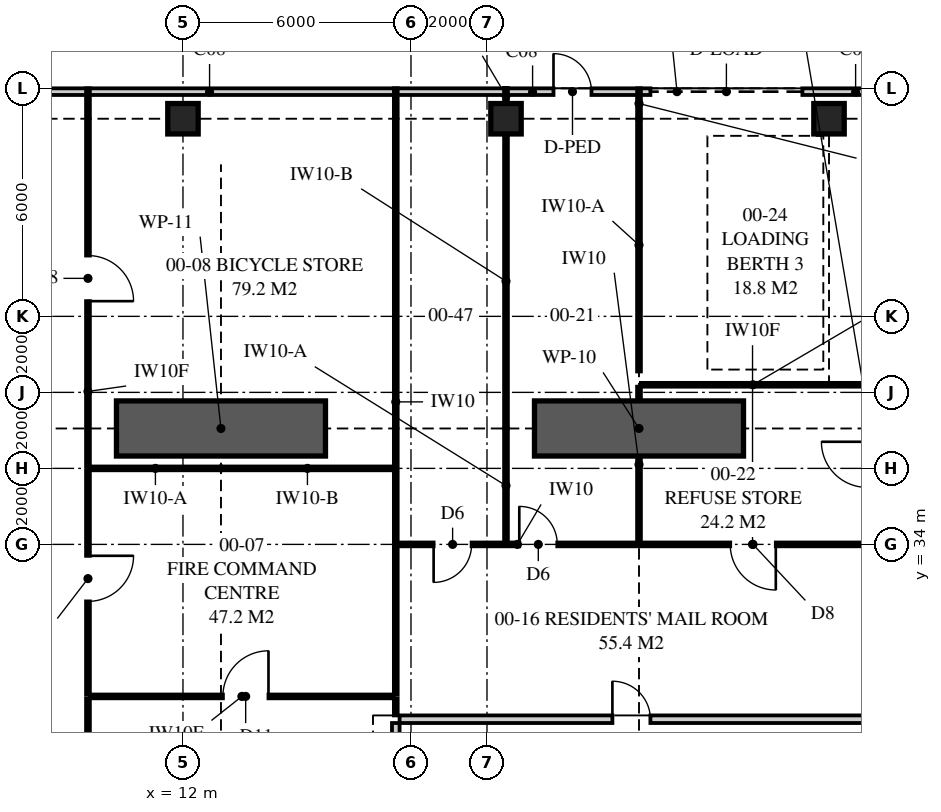
"""IFC4 building model, lengths in metres.
Left out: names, types, materials, properties, quantities, classifications, styles, units other than length and angle.
Written with IfcOpenShell. Run it as: python <this file> out.ifc"""

import sys

from ifc_helpers import new_model, si_unit, direction, frame, frame_2d, origin, origin_2d, place, context, subcontext, project, spatial, polyline, rectangle, outline, extrude, element, fill, save


model = new_model("IFC4")
c1 = context("Model", 3, precision=1e-05, world=origin(), true_north=direction((0.0, 1.0)))
c2 = subcontext(c1, "Body", "Model", "MODEL_VIEW")
j1 = project(units=[si_unit("LENGTHUNIT", "METRE"), si_unit("PLANEANGLEUNIT", "RADIAN")], contexts=[c1])
p1 = place(None, origin())
s1 = spatial("IfcSite", under=j1, at=p1, CompositionType="ELEMENT")
p2 = place(p1, origin())
s2 = spatial("IfcBuilding", under=s1, at=p2, CompositionType="ELEMENT")
p3 = place(p2, origin())
s3 = spatial("IfcBuildingStorey", under=s2, at=p3, CompositionType="ELEMENT", Elevation=0.0)
for number, where, z_axis, x_axis in (
    (1, (12.0, 45.2, 0.0), (0.0, 0.0, 1.0), (1.0, 0.0, 0.0)),
    (2, (20.5, 45.2, 0.0), (0.0, 0.0, 1.0), (1.0, 0.0, 0.0)),
    (3, (29.0, 45.2, 0.0), (0.0, 0.0, 1.0), (1.0, 0.0, 0.0)),
):
    element("IfcColumn", number, at=place(p3, frame(where, z_axis=z_axis, x_axis=x_axis)), inside=s3, PredefinedType="COLUMN", context=c2, shape_type="SweptSolid", body=[
        extrude(rectangle(XDim=0.8, YDim=0.8, at=origin_2d()), origin(), (0.0, 0.0, 1.0), 6.0),
    ])
p4 = place(p3, frame((59.2, 45.913, 0.0), z_axis=(0.0, 0.0, 1.0), x_axis=(-1.0, 0.0, 0.0)))
e4 = element("IfcWall", 4, at=p4, inside=s3, PredefinedType="SOLIDWALL", context=c2, shape_type="SweptSolid", body=[
    extrude(rectangle(XDim=68.4, YDim=0.175, at=frame_2d((34.2, 0.0))), origin(), (0.0, 0.0, 1.0), 5.12),
])
p5 = place(p4, frame((0.6, 0.0, 0.0)))
e5 = element("IfcOpeningElement", 5, at=p5, cuts=e4, PredefinedType="OPENING", context=c2, shape_type="SweptSolid", body=[
    extrude(rectangle(XDim=3.6, YDim=4.8, at=frame_2d((1.8, 2.4))), frame((0.0, 0.097, 0.0), z_axis=(0.0, -1.0, 0.0), x_axis=(1.0, 0.0, 0.0)), (0.0, 0.0, 1.0), 0.195),
])
p6 = place(p4, frame((7.1, 0.0, 0.0)))
e6 = element("IfcOpeningElement", 6, at=p6, cuts=e4, PredefinedType="OPENING", context=c2, shape_type="SweptSolid", body=[
    extrude(rectangle(XDim=4.0, YDim=3.0, at=frame_2d((2.0, 1.5))), frame((0.0, 0.097, 0.0), z_axis=(0.0, -1.0, 0.0), x_axis=(1.0, 0.0, 0.0)), (0.0, 0.0, 1.0), 0.195),
])
p7 = place(p4, frame((30.9, 0.0, 0.0)))
e7 = element("IfcOpeningElement", 7, at=p7, cuts=e4, PredefinedType="OPENING", context=c2, shape_type="SweptSolid", body=[
    extrude(rectangle(XDim=4.0, YDim=4.5, at=frame_2d((2.0, 2.25))), frame((0.0, 0.097, 0.0), z_axis=(0.0, -1.0, 0.0), x_axis=(1.0, 0.0, 0.0)), (0.0, 0.0, 1.0), 0.195),
])
p8 = place(p4, frame((17.0, 0.0, 0.0)))
e8 = element("IfcOpeningElement", 8, at=p8, cuts=e4, PredefinedType="OPENING", context=c2, shape_type="SweptSolid", body=[
    extrude(rectangle(XDim=4.0, YDim=4.5, at=frame_2d((2.0, 2.25))), frame((0.0, 0.097, 0.0), z_axis=(0.0, -1.0, 0.0), x_axis=(1.0, 0.0, 0.0)), (0.0, 0.0, 1.0), 0.195),
])
p9 = place(p4, frame((36.45, 0.0, 0.0)))
e9 = element("IfcOpeningElement", 9, at=p9, cuts=e4, PredefinedType="OPENING", context=c2, shape_type="SweptSolid", body=[
    extrude(rectangle(XDim=1.0, YDim=2.2, at=frame_2d((0.5, 1.1))), frame((0.0, 0.097, 0.0), z_axis=(0.0, -1.0, 0.0), x_axis=(1.0, 0.0, 0.0)), (0.0, 0.0, 1.0), 0.195),
])
p10 = place(p4, frame((51.95, 0.0, 0.0)))
e10 = element("IfcOpeningElement", 10, at=p10, cuts=e4, PredefinedType="OPENING", context=c2, shape_type="SweptSolid", body=[
    extrude(rectangle(XDim=2.0, YDim=2.7, at=frame_2d((1.0, 1.35))), frame((0.0, 0.097, 0.0), z_axis=(0.0, -1.0, 0.0), x_axis=(1.0, 0.0, 0.0)), (0.0, 0.0, 1.0), 0.195),
])
p11 = place(p4, frame((61.781, 0.0, 0.0)))
e11 = element("IfcOpeningElement", 11, at=p11, cuts=e4, PredefinedType="OPENING", context=c2, shape_type="SweptSolid", body=[
    extrude(rectangle(XDim=1.8, YDim=2.7, at=frame_2d((0.9, 1.35))), frame((0.0, 0.097, 0.0), z_axis=(0.0, -1.0, 0.0), x_axis=(1.0, 0.0, 0.0)), (0.0, 0.0, 1.0), 0.195),
])
p12 = place(p4, frame((57.666, 0.0, 0.3)))
e12 = element("IfcOpeningElement", 12, at=p12, cuts=e4, PredefinedType="OPENING", context=c2, shape_type="SweptSolid", body=[
    extrude(rectangle(XDim=2.4, YDim=3.0, at=frame_2d((1.2, 1.5))), frame((0.0, 0.097, 0.0), z_axis=(0.0, -1.0, 0.0), x_axis=(1.0, 0.0, 0.0)), (0.0, 0.0, 1.0), 0.195),
])
p13 = place(p4, frame((65.129, 0.0, 0.3)))
e13 = element("IfcOpeningElement", 13, at=p13, cuts=e4, PredefinedType="OPENING", context=c2, shape_type="SweptSolid", body=[
    extrude(rectangle(XDim=2.4, YDim=3.0, at=frame_2d((1.2, 1.5))), frame((0.0, 0.097, 0.0), z_axis=(0.0, -1.0, 0.0), x_axis=(1.0, 0.0, 0.0)), (0.0, 0.0, 1.0), 0.195),
])
p14 = place(p3, frame((9.5, 25.0, 0.0), z_axis=(0.0, 0.0, 1.0), x_axis=(0.0, 1.0, 0.0)))
e14 = element("IfcWall", 14, at=p14, inside=s3, PredefinedType="PARTITIONING", context=c2, shape_type="SweptSolid", body=[
    extrude(outline(polyline([(0.0, 0.0), (4.95, 0.0), (4.95, 5.72), (1.26, 5.72), (1.26, 5.12), (0.0, 5.12), (0.0, 0.0)])), frame((0.0, 0.05, 0.0), z_axis=(0.0, -1.0, 0.0), x_axis=(1.0, 0.0, 0.0)), (0.0, 0.0, 1.0), 0.1),
])
p15 = place(p3, frame((9.5, 30.05, 0.0), z_axis=(0.0, 0.0, 1.0), x_axis=(0.0, 1.0, 0.0)))
e15 = element("IfcWall", 15, at=p15, inside=s3, PredefinedType="PARTITIONING", context=c2, shape_type="SweptSolid", body=[
    extrude(outline(polyline([(0.0, 0.0), (5.9, 0.0), (5.9, 5.72), (5.9, 4.92), (5.74, 4.92), (5.74, 5.72), (0.0, 5.72), (0.0, 0.0)])), frame((0.0, 0.05, 0.0), z_axis=(0.0, -1.0, 0.0), x_axis=(1.0, 0.0, 0.0)), (0.0, 0.0, 1.0), 0.1),
])
p16 = place(p15, frame((2.45, 0.0, 0.0)))
e16 = element("IfcOpeningElement", 16, at=p16, cuts=e15, PredefinedType="OPENING", context=c2, shape_type="SweptSolid", body=[
    extrude(rectangle(XDim=1.2, YDim=2.2, at=frame_2d((0.6, 1.1))), frame((0.0, 0.06, 0.0), z_axis=(0.0, -1.0, 0.0), x_axis=(1.0, 0.0, 0.0)), (0.0, 0.0, 1.0), 0.12),
])
p17 = place(p3, frame((9.5, 36.05, 0.0), z_axis=(0.0, 0.0, 1.0), x_axis=(0.0, 1.0, 0.0)))
e17 = element("IfcWall", 17, at=p17, inside=s3, PredefinedType="PARTITIONING", context=c2, shape_type="SweptSolid", body=[
    extrude(outline(polyline([(0.0, 0.0), (9.95, 0.0), (9.95, 5.72), (9.95, 5.12), (7.89, 5.12), (7.89, 5.72), (2.26, 5.72), (2.26, 4.92), (0.0, 4.92), (0.0, 5.72), (0.0, 0.0)])), frame((0.0, 0.05, 0.0), z_axis=(0.0, -1.0, 0.0), x_axis=(1.0, 0.0, 0.0)), (0.0, 0.0, 1.0), 0.1),
])
p18 = place(p17, frame((4.35, 0.0, 0.0)))
e18 = element("IfcOpeningElement", 18, at=p18, cuts=e17, PredefinedType="OPENING", context=c2, shape_type="SweptSolid", body=[
    extrude(rectangle(XDim=1.2, YDim=2.4, at=frame_2d((0.6, 1.2))), frame((0.0, 0.06, 0.0), z_axis=(0.0, -1.0, 0.0), x_axis=(1.0, 0.0, 0.0)), (0.0, 0.0, 1.0), 0.12),
])
p19 = place(p3, frame((9.55, 30.0, 0.0), z_axis=(0.0, 0.0, 1.0), x_axis=(1.0, 0.0, 0.0)))
e19 = element("IfcWall", 19, at=p19, inside=s3, PredefinedType="PARTITIONING", context=c2, shape_type="SweptSolid", body=[
    extrude(outline(polyline([(0.0, 0.0), (8.0, 0.0), (8.0, 5.72), (4.71, 5.72), (4.71, 5.12), (2.19, 5.12), (2.19, 5.72), (0.0, 5.72), (0.0, 0.0)])), frame((0.0, 0.05, 0.0), z_axis=(0.0, -1.0, 0.0), x_axis=(1.0, 0.0, 0.0)), (0.0, 0.0, 1.0), 0.1),
])
p20 = place(p19, frame((3.5, 0.0, 0.0)))
e20 = element("IfcOpeningElement", 20, at=p20, cuts=e19, PredefinedType="OPENING", context=c2, shape_type="SweptSolid", body=[
    extrude(rectangle(XDim=1.2, YDim=2.2, at=frame_2d((0.6, 1.1))), frame((0.0, 0.06, 0.0), z_axis=(0.0, -1.0, 0.0), x_axis=(1.0, 0.0, 0.0)), (0.0, 0.0, 1.0), 0.12),
])
p21 = place(p3, frame((17.6, 27.75, 0.0), z_axis=(0.0, 0.0, 1.0), x_axis=(0.0, 1.0, 0.0)))
e21 = element("IfcWall", 21, at=p21, inside=s3, PredefinedType="PARTITIONING", context=c2, shape_type="SweptSolid", body=[
    extrude(rectangle(XDim=1.55, YDim=0.2, at=frame_2d((0.775, 0.0))), origin(), (0.0, 0.0, 1.0), 5.72),
])
p22 = place(p3, frame((17.6, 29.5, 0.0), z_axis=(0.0, 0.0, 1.0), x_axis=(0.0, 1.0, 0.0)))
e22 = element("IfcWall", 22, at=p22, inside=s3, PredefinedType="PARTITIONING", context=c2, shape_type="SweptSolid", body=[
    extrude(rectangle(XDim=0.45, YDim=0.1, at=frame_2d((0.225, 0.0))), origin(), (0.0, 0.0, 1.0), 5.72),
])
p23 = place(p3, frame((9.55, 36.0, 0.0), z_axis=(0.0, 0.0, 1.0), x_axis=(1.0, 0.0, 0.0)))
e23 = element("IfcWall", 23, at=p23, inside=s3, PredefinedType="PARTITIONING", context=c2, shape_type="SweptSolid", body=[
    extrude(rectangle(XDim=3.45, YDim=0.1, at=frame_2d((1.725, 0.0))), origin(), (0.0, 0.0, 1.0), 4.92),
])
p24 = place(p3, frame((13.0, 36.0, 0.0), z_axis=(0.0, 0.0, 1.0), x_axis=(1.0, 0.0, 0.0)))
e24 = element("IfcWall", 24, at=p24, inside=s3, PredefinedType="PARTITIONING", context=c2, shape_type="SweptSolid", body=[
    extrude(outline(polyline([(0.0, 0.0), (4.55, 0.0), (4.55, 5.12), (0.06, 5.12), (0.06, 4.92), (0.0, 4.92), (0.0, 0.0)])), frame((0.0, 0.05, 0.0), z_axis=(0.0, -1.0, 0.0), x_axis=(1.0, 0.0, 0.0)), (0.0, 0.0, 1.0), 0.1),
])
p25 = place(p3, frame((17.6, 30.05, 0.0), z_axis=(0.0, 0.0, 1.0), x_axis=(0.0, 1.0, 0.0)))
e25 = element("IfcWall", 25, at=p25, inside=s3, PredefinedType="PARTITIONING", context=c2, shape_type="SweptSolid", body=[
    extrude(rectangle(XDim=3.9, YDim=0.1, at=frame_2d((1.95, 0.0))), origin(), (0.0, 0.0, 1.0), 5.72),
])
p26 = place(p3, frame((17.6, 34.05, 0.0), z_axis=(0.0, 0.0, 1.0), x_axis=(0.0, 1.0, 0.0)))
e26 = element("IfcWall", 26, at=p26, inside=s3, PredefinedType="PARTITIONING", context=c2, shape_type="SweptSolid", body=[
    extrude(outline(polyline([(0.0, 0.0), (1.9, 0.0), (1.9, 5.72), (1.9, 5.12), (1.74, 5.12), (1.74, 5.72), (0.0, 5.72), (0.0, 0.0)])), frame((0.0, 0.05, 0.0), z_axis=(0.0, -1.0, 0.0), x_axis=(1.0, 0.0, 0.0)), (0.0, 0.0, 1.0), 0.1),
])
p27 = place(p3, frame((17.6, 36.05, 0.0), z_axis=(0.0, 0.0, 1.0), x_axis=(0.0, 1.0, 0.0)))
e27 = element("IfcWall", 27, at=p27, inside=s3, PredefinedType="PARTITIONING", context=c2, shape_type="SweptSolid", body=[
    extrude(outline(polyline([(0.0, 0.0), (9.95, 0.0), (9.95, 5.72), (9.95, 5.12), (7.89, 5.12), (7.89, 5.72), (2.26, 5.72), (2.26, 5.12), (0.0, 5.12), (0.0, 5.72), (0.0, 0.0)])), frame((0.0, 0.05, 0.0), z_axis=(0.0, -1.0, 0.0), x_axis=(1.0, 0.0, 0.0)), (0.0, 0.0, 1.0), 0.1),
])
p28 = place(p3, frame((17.7, 29.4, 0.0), z_axis=(0.0, 0.0, 1.0), x_axis=(1.0, 0.0, 0.0)))
e28 = element("IfcWall", 28, at=p28, inside=s3, PredefinedType="PARTITIONING", context=c2, shape_type="SweptSolid", body=[
    extrude(outline(polyline([(0.0, 0.0), (12.225, 0.0), (12.225, 5.72), (7.61, 5.72), (7.61, 5.12), (4.99, 5.12), (4.99, 5.72), (0.0, 5.72), (0.0, 0.0)])), frame((0.0, 0.1, 0.0), z_axis=(0.0, -1.0, 0.0), x_axis=(1.0, 0.0, 0.0)), (0.0, 0.0, 1.0), 0.2),
])
p29 = place(p28, frame((5.6, 0.0, 0.0)))
e29 = element("IfcOpeningElement", 29, at=p29, cuts=e28, PredefinedType="OPENING", context=c2, shape_type="SweptSolid", body=[
    extrude(rectangle(XDim=1.0, YDim=2.1, at=frame_2d((0.5, 1.05))), frame((0.0, 0.11, 0.0), z_axis=(0.0, -1.0, 0.0), x_axis=(1.0, 0.0, 0.0)), (0.0, 0.0, 1.0), 0.22),
])
p30 = place(p3, frame((17.65, 34.0, 0.0), z_axis=(0.0, 0.0, 1.0), x_axis=(1.0, 0.0, 0.0)))
e30 = element("IfcWall", 30, at=p30, inside=s3, PredefinedType="PARTITIONING", context=c2, shape_type="SweptSolid", body=[
    extrude(outline(polyline([(0.0, 0.0), (6.3, 0.0), (6.3, 5.72), (6.3, 5.12), (5.09, 5.12), (5.09, 5.72), (0.0, 5.72), (0.0, 0.0)])), frame((0.0, 0.05, 0.0), z_axis=(0.0, -1.0, 0.0), x_axis=(1.0, 0.0, 0.0)), (0.0, 0.0, 1.0), 0.1),
])
p31 = place(p30, frame((3.2, 0.0, 0.0)))
e31 = element("IfcOpeningElement", 31, at=p31, cuts=e30, PredefinedType="OPENING", context=c2, shape_type="SweptSolid", body=[
    extrude(rectangle(XDim=1.0, YDim=2.1, at=frame_2d((0.5, 1.05))), frame((0.0, 0.06, 0.0), z_axis=(0.0, -1.0, 0.0), x_axis=(1.0, 0.0, 0.0)), (0.0, 0.0, 1.0), 0.12),
])
p32 = place(p30, frame((0.946, 0.0, 0.0)))
e32 = element("IfcOpeningElement", 32, at=p32, cuts=e30, PredefinedType="OPENING", context=c2, shape_type="SweptSolid", body=[
    extrude(rectangle(XDim=1.0, YDim=2.1, at=frame_2d((0.5, 1.05))), frame((0.0, 0.06, 0.0), z_axis=(0.0, -1.0, 0.0), x_axis=(1.0, 0.0, 0.0)), (0.0, 0.0, 1.0), 0.12),
])
p33 = place(p3, frame((24.05, 34.0, 0.0), z_axis=(0.0, 0.0, 1.0), x_axis=(1.0, 0.0, 0.0)))
e33 = element("IfcWall", 33, at=p33, inside=s3, PredefinedType="PARTITIONING", context=c2, shape_type="SweptSolid", body=[
    extrude(outline(polyline([(0.0, 0.0), (5.875, 0.0), (5.875, 5.72), (1.21, 5.72), (1.21, 5.12), (0.0, 5.12), (0.0, 5.72), (0.0, 0.0)])), frame((0.0, 0.05, 0.0), z_axis=(0.0, -1.0, 0.0), x_axis=(1.0, 0.0, 0.0)), (0.0, 0.0, 1.0), 0.1),
])
p34 = place(p33, frame((2.35, 0.0, 0.0)))
e34 = element("IfcOpeningElement", 34, at=p34, cuts=e33, PredefinedType="OPENING", context=c2, shape_type="SweptSolid", body=[
    extrude(rectangle(XDim=1.2, YDim=2.4, at=frame_2d((0.6, 1.2))), frame((0.0, 0.06, 0.0), z_axis=(0.0, -1.0, 0.0), x_axis=(1.0, 0.0, 0.0)), (0.0, 0.0, 1.0), 0.12),
])
p35 = place(p3, frame((24.0, 34.05, 0.0), z_axis=(0.0, 0.0, 1.0), x_axis=(0.0, 1.0, 0.0)))
e35 = element("IfcWall", 35, at=p35, inside=s3, PredefinedType="PARTITIONING", context=c2, shape_type="SweptSolid", body=[
    extrude(outline(polyline([(0.0, 0.0), (4.1, 0.0), (4.1, 5.72), (4.1, 5.12), (3.06, 5.12), (0.0, 5.12), (0.0, 5.72), (0.0, 0.0)])), frame((0.0, 0.05, 0.0), z_axis=(0.0, -1.0, 0.0), x_axis=(1.0, 0.0, 0.0)), (0.0, 0.0, 1.0), 0.1),
])
p36 = place(p3, frame((24.0, 38.55, 0.0), z_axis=(0.0, 0.0, 1.0), x_axis=(0.0, 1.0, 0.0)))
e36 = element("IfcWall", 36, at=p36, inside=s3, PredefinedType="PARTITIONING", context=c2, shape_type="SweptSolid", body=[
    extrude(rectangle(XDim=6.65, YDim=0.1, at=frame_2d((3.325, 0.0))), origin(), (0.0, 0.0, 1.0), 5.12),
])
p37 = place(p3, frame((24.0, 45.2, 0.0), z_axis=(0.0, 0.0, 1.0), x_axis=(0.0, 1.0, 0.0)))
e37 = element("IfcWall", 37, at=p37, inside=s3, PredefinedType="PARTITIONING", context=c2, shape_type="SweptSolid", body=[
    extrude(rectangle(XDim=0.8, YDim=0.1, at=frame_2d((0.4, 0.0))), origin(), (0.0, 0.0, 1.0), 5.12),
])
p38 = place(p3, frame((24.05, 38.2, 0.0), z_axis=(0.0, 0.0, 1.0), x_axis=(1.0, 0.0, 0.0)))
e38 = element("IfcWall", 38, at=p38, inside=s3, PredefinedType="PARTITIONING", context=c2, shape_type="SweptSolid", body=[
    extrude(outline(polyline([(0.0, 0.0), (5.9, 0.0), (5.9, 5.72), (5.9, 5.12), (1.21, 5.12), (0.01, 5.12), (0.0, 5.12), (0.0, 5.72), (0.0, 0.0)])), frame((0.0, 0.05, 0.0), z_axis=(0.0, -1.0, 0.0), x_axis=(1.0, 0.0, 0.0)), (0.0, 0.0, 1.0), 0.1),
])
p39 = place(p3, frame((20.5, 34.04, 0.0), z_axis=(0.0, 0.0, 1.0), x_axis=(0.0, 1.0, 0.0)))
e39 = element("IfcWall", 39, at=p39, inside=s3, PredefinedType="PARTITIONING", context=c2, shape_type="SweptSolid", body=[
    extrude(outline(polyline([(0.0, 0.0), (3.01, 0.0), (3.01, 5.12), (1.75, 5.12), (1.75, 5.72), (0.0, 5.72), (0.0, 0.0)])), frame((0.0, 0.05, 0.0), z_axis=(0.0, -1.0, 0.0), x_axis=(1.0, 0.0, 0.0)), (0.0, 0.0, 1.0), 0.1),
])
p40 = place(p3, frame((20.5, 37.05, 0.0), z_axis=(0.0, 0.0, 1.0), x_axis=(0.0, 1.0, 0.0)))
e40 = element("IfcWall", 40, at=p40, inside=s3, PredefinedType="PARTITIONING", context=c2, shape_type="SweptSolid", body=[
    extrude(rectangle(XDim=7.75, YDim=0.1, at=frame_2d((3.875, 0.0))), origin(), (0.0, 0.0, 1.0), 5.12),
])
p41 = place(p3, frame((20.5, 45.6, 0.0), z_axis=(0.0, 0.0, 1.0), x_axis=(0.0, 1.0, 0.0)))
e41 = element("IfcWall", 41, at=p41, inside=s3, PredefinedType="PARTITIONING", context=c2, shape_type="SweptSolid", body=[
    extrude(outline(polyline([(0.0, 0.0), (0.41, 0.0), (0.41, 5.72), (0.41, 5.12), (0.0, 5.12), (0.0, 5.72), (0.0, 0.0)])), frame((0.0, 0.05, 0.0), z_axis=(0.0, -1.0, 0.0), x_axis=(1.0, 0.0, 0.0)), (0.0, 0.0, 1.0), 0.1),
])
for number, where, z_axis, x_axis in (
    (42, (21.25, 37.05, 0.0), (0.0, 0.0, 1.0), (1.0, 0.0, 0.0)),
    (43, (10.25, 37.05, 0.0), (0.0, 0.0, 1.0), (1.0, 0.0, 0.0)),
):
    element("IfcWall", number, at=place(p3, frame(where, z_axis=z_axis, x_axis=x_axis)), inside=s3, PredefinedType="SHEAR", context=c2, shape_type="SweptSolid", body=[
        extrude(rectangle(XDim=5.5, YDim=1.45, at=frame_2d((2.75, 0.0))), origin(), (0.0, 0.0, 1.0), 6.0),
    ])
p42 = place(p7, frame((4.0, 0.0, 0.0), z_axis=(0.0, 0.0, 1.0), x_axis=(-1.0, 0.0, 0.0)))
e44 = element("IfcDoor", 44, at=p42, inside=s3, OperationType="ROLLINGUP", PredefinedType="DOOR", context=c2, shape_type="SweptSolid", body=[
    extrude(rectangle(XDim=4.0, YDim=4.5, at=frame_2d((2.0, 2.25))), frame((0.0, 0.025, 0.0), z_axis=(0.0, -1.0, 0.0), x_axis=(1.0, 0.0, 0.0)), (0.0, 0.0, 1.0), 0.05),
])
fill(e7, e44)
p43 = place(p9, frame((1.0, 0.0, 0.0), z_axis=(0.0, 0.0, 1.0), x_axis=(-1.0, 0.0, 0.0)))
e45 = element("IfcDoor", 45, at=p43, inside=s3, OperationType="SINGLE_SWING_LEFT", PredefinedType="DOOR", context=c2, shape_type="SweptSolid", body=[
    extrude(rectangle(XDim=1.0, YDim=2.2, at=frame_2d((0.5, 1.1))), frame((0.0, 0.025, 0.0), z_axis=(0.0, -1.0, 0.0), x_axis=(1.0, 0.0, 0.0)), (0.0, 0.0, 1.0), 0.05),
])
fill(e9, e45)
p44 = place(p18, frame((1.2, 0.0, 0.0), z_axis=(0.0, 0.0, 1.0), x_axis=(-1.0, 0.0, 0.0)))
e46 = element("IfcDoor", 46, at=p44, inside=s3, OperationType="SINGLE_SWING_RIGHT", PredefinedType="DOOR", context=c2, shape_type="SweptSolid", body=[
    extrude(rectangle(XDim=1.2, YDim=2.4, at=frame_2d((0.6, 1.2))), frame((0.0, 0.025, 0.0), z_axis=(0.0, -1.0, 0.0), x_axis=(1.0, 0.0, 0.0)), (0.0, 0.0, 1.0), 0.05),
])
fill(e18, e46)
p45 = place(p20, origin())
e47 = element("IfcDoor", 47, at=p45, inside=s3, OperationType="SINGLE_SWING_RIGHT", PredefinedType="DOOR", context=c2, shape_type="SweptSolid", body=[
    extrude(rectangle(XDim=1.2, YDim=2.2, at=frame_2d((0.6, 1.1))), frame((0.0, 0.025, 0.0), z_axis=(0.0, -1.0, 0.0), x_axis=(1.0, 0.0, 0.0)), (0.0, 0.0, 1.0), 0.05),
])
fill(e20, e47)
p46 = place(p16, frame((1.2, 0.0, 0.0), z_axis=(0.0, 0.0, 1.0), x_axis=(-1.0, 0.0, 0.0)))
e48 = element("IfcDoor", 48, at=p46, inside=s3, OperationType="SINGLE_SWING_LEFT", PredefinedType="DOOR", context=c2, shape_type="SweptSolid", body=[
    extrude(rectangle(XDim=1.2, YDim=2.2, at=frame_2d((0.6, 1.1))), frame((0.0, 0.025, 0.0), z_axis=(0.0, -1.0, 0.0), x_axis=(1.0, 0.0, 0.0)), (0.0, 0.0, 1.0), 0.05),
])
fill(e16, e48)
p47 = place(p29, origin())
e49 = element("IfcDoor", 49, at=p47, inside=s3, OperationType="SINGLE_SWING_LEFT", PredefinedType="DOOR", context=c2, shape_type="SweptSolid", body=[
    extrude(rectangle(XDim=1.0, YDim=2.1, at=frame_2d((0.5, 1.05))), frame((0.0, 0.025, 0.0), z_axis=(0.0, -1.0, 0.0), x_axis=(1.0, 0.0, 0.0)), (0.0, 0.0, 1.0), 0.05),
])
fill(e29, e49)
p48 = place(p31, origin())
e50 = element("IfcDoor", 50, at=p48, inside=s3, OperationType="SINGLE_SWING_LEFT", PredefinedType="DOOR", context=c2, shape_type="SweptSolid", body=[
    extrude(rectangle(XDim=1.0, YDim=2.1, at=frame_2d((0.5, 1.05))), frame((0.0, 0.025, 0.0), z_axis=(0.0, -1.0, 0.0), x_axis=(1.0, 0.0, 0.0)), (0.0, 0.0, 1.0), 0.05),
])
fill(e31, e50)
p49 = place(p34, frame((1.2, 0.0, 0.0), z_axis=(0.0, 0.0, 1.0), x_axis=(-1.0, 0.0, 0.0)))
e51 = element("IfcDoor", 51, at=p49, inside=s3, OperationType="SINGLE_SWING_LEFT", PredefinedType="DOOR", context=c2, shape_type="SweptSolid", body=[
    extrude(rectangle(XDim=1.2, YDim=2.4, at=frame_2d((0.6, 1.2))), frame((0.0, 0.025, 0.0), z_axis=(0.0, -1.0, 0.0), x_axis=(1.0, 0.0, 0.0)), (0.0, 0.0, 1.0), 0.05),
])
fill(e34, e51)
p50 = place(p32, frame((1.0, 0.0, 0.0), z_axis=(0.0, 0.0, 1.0), x_axis=(-1.0, 0.0, 0.0)))
e52 = element("IfcDoor", 52, at=p50, inside=s3, OperationType="SINGLE_SWING_RIGHT", PredefinedType="DOOR", context=c2, shape_type="SweptSolid", body=[
    extrude(rectangle(XDim=1.0, YDim=2.1, at=frame_2d((0.5, 1.05))), frame((0.0, 0.025, 0.0), z_axis=(0.0, -1.0, 0.0), x_axis=(1.0, 0.0, 0.0)), (0.0, 0.0, 1.0), 0.05),
])
fill(e32, e52)
save(model, sys.argv[1])
